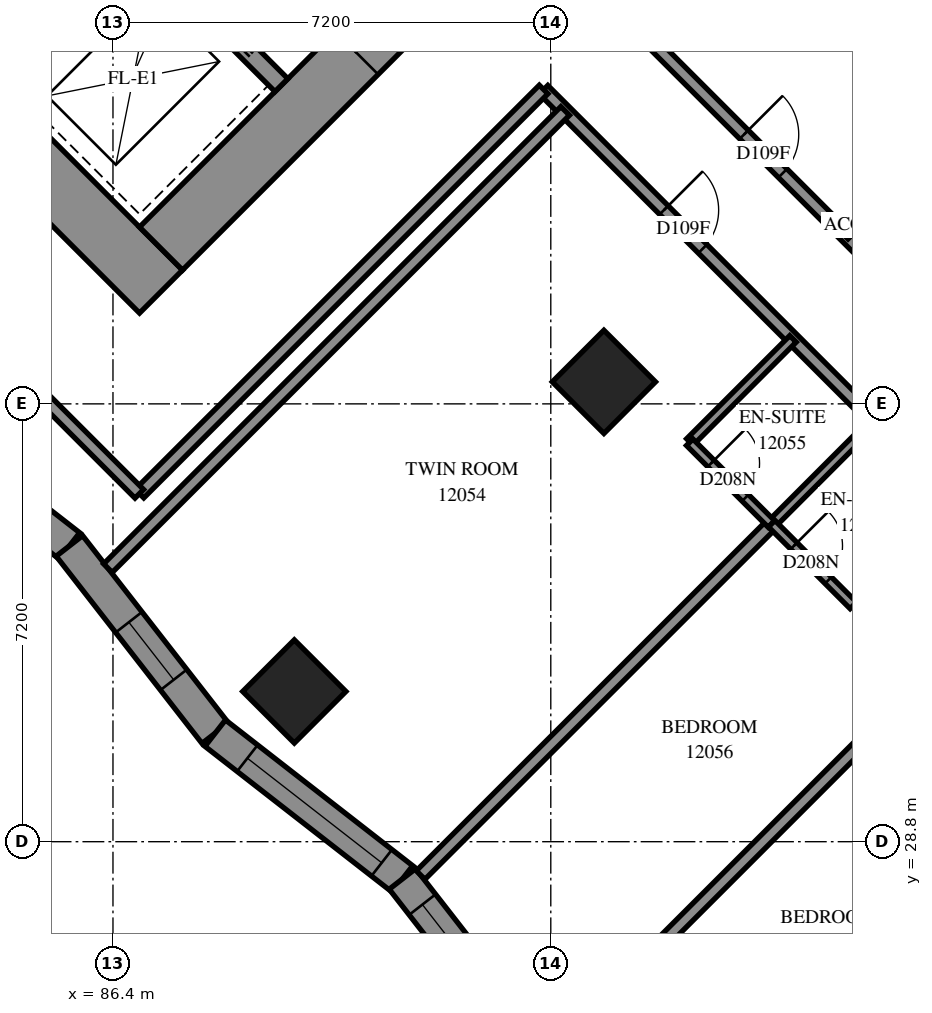
"""IFC4 building model, lengths in metres.
Left out: names, types, materials, properties, quantities, classifications, styles, units other than length and angle.
Written with IfcOpenShell. Run it as: python <this file> out.ifc"""

import sys

from ifc_helpers import new_model, si_unit, direction, frame, frame_2d, origin, origin_2d, place, context, subcontext, project, spatial, polyline, rectangle, outline, extrude, element, fill, save


model = new_model("IFC4")
c1 = context("Model", 3, precision=1e-05, world=origin(), true_north=direction((0.0, 1.0)))
c2 = subcontext(c1, "Body", "Model", "MODEL_VIEW")
j1 = project(units=[si_unit("LENGTHUNIT", "METRE"), si_unit("PLANEANGLEUNIT", "RADIAN")], contexts=[c1])
p1 = place(None, origin())
s1 = spatial("IfcSite", under=j1, at=p1, CompositionType="ELEMENT")
p2 = place(p1, origin())
s2 = spatial("IfcBuilding", under=s1, at=p2, CompositionType="ELEMENT")
p3 = place(p2, frame((0.0, 0.0, 47.4)))
s3 = spatial("IfcBuildingStorey", under=s2, at=p3, CompositionType="ELEMENT", Elevation=47.4)
for number, where, z_axis, x_axis in (
    (1, (94.474, 36.362, 0.0), (0.0, 0.0, 1.0), (0.707, -0.707, 0.0)),
    (2, (89.382, 31.271, 0.0), (0.0, 0.0, 1.0), (0.707, -0.707, 0.0)),
):
    element("IfcColumn", number, at=place(p3, frame(where, z_axis=z_axis, x_axis=x_axis)), inside=s3, PredefinedType="COLUMN", context=c2, shape_type="SweptSolid", body=[
        extrude(rectangle(XDim=1.2, YDim=1.2, at=origin_2d()), origin(), (0.0, 0.0, 1.0), 3.1),
    ])
p4 = place(p3, frame((75.594, 49.443, -0.3), z_axis=(0.0, 0.0, 1.0), x_axis=(0.7071037324, -0.70710983, 0.0)))
e3 = element("IfcWall", 3, at=p4, inside=s3, PredefinedType="SHEAR", context=c2, shape_type="SweptSolid", body=[
    extrude(rectangle(XDim=16.4, YDim=1.0, at=frame_2d((8.2, 0.0))), origin(), (0.0, 0.0, 1.0), 2.7),
])
p5 = place(p3, frame((87.19, 38.554, -0.3), z_axis=(0.0, 0.0, 1.0), x_axis=(0.707103309, 0.7071102534, 0.0)))
e4 = element("IfcWall", 4, at=p5, inside=s3, PredefinedType="SHEAR", context=c2, shape_type="SweptSolid", body=[
    extrude(rectangle(XDim=14.4, YDim=1.0, at=frame_2d((7.2, 0.0))), origin(), (0.0, 0.0, 1.0), 2.7),
])
p6 = place(p5, frame((4.55, 0.0, 0.3)))
e5 = element("IfcOpeningElement", 5, at=p6, cuts=e4, PredefinedType="OPENING", context=c2, shape_type="SweptSolid", body=[
    extrude(rectangle(XDim=1.1, YDim=2.1, at=frame_2d((0.55, 1.05))), frame((0.0, 0.51, 0.0), z_axis=(0.0, -1.0, 0.0), x_axis=(1.0, 0.0, 0.0)), (0.0, 0.0, 1.0), 1.02),
])
p7 = place(p5, frame((11.35, 0.0, 0.3)))
e6 = element("IfcOpeningElement", 6, at=p7, cuts=e4, PredefinedType="OPENING", context=c2, shape_type="SweptSolid", body=[
    extrude(rectangle(XDim=1.1, YDim=2.1, at=frame_2d((0.55, 1.05))), frame((0.0, 0.51, 0.0), z_axis=(0.0, -1.0, 0.0), x_axis=(1.0, 0.0, 0.0)), (0.0, 0.0, 1.0), 1.02),
])
p8 = place(p3, frame((84.291, 41.453, 0.0), z_axis=(0.0, 0.0, 1.0), x_axis=(0.7071067812, 0.7071067812, 0.0)))
e7 = element("IfcWall", 7, at=p8, inside=s3, PredefinedType="SOLIDWALL", context=c2, shape_type="SweptSolid", body=[
    extrude(rectangle(XDim=3.3, YDim=0.3, at=frame_2d((1.65, 0.0))), origin(), (0.0, 0.0, 1.0), 3.1),
])
p9 = place(p3, frame((78.988, 51.423, 0.0), z_axis=(0.0, 0.0, 1.0), x_axis=(0.7071067812, -0.7071067812, 0.0)))
e8 = element("IfcWall", 8, at=p9, inside=s3, PredefinedType="SOLIDWALL", context=c2, shape_type="SweptSolid", body=[
    extrude(rectangle(XDim=14.4, YDim=0.3, at=frame_2d((7.2, 0.0))), origin(), (0.0, 0.0, 1.0), 3.1),
])
p10 = place(p9, frame((1.25, 0.0, 0.0)))
e9 = element("IfcOpeningElement", 9, at=p10, cuts=e8, PredefinedType="OPENING", context=c2, shape_type="SweptSolid", body=[
    extrude(rectangle(XDim=1.1, YDim=2.1, at=frame_2d((0.55, 1.05))), frame((0.0, 0.16, 0.0), z_axis=(0.0, -1.0, 0.0), x_axis=(1.0, 0.0, 0.0)), (0.0, 0.0, 1.0), 0.32),
])
p11 = place(p9, frame((4.85, 0.0, 0.0)))
e10 = element("IfcOpeningElement", 10, at=p11, cuts=e8, PredefinedType="OPENING", context=c2, shape_type="SweptSolid", body=[
    extrude(rectangle(XDim=1.1, YDim=2.1, at=frame_2d((0.55, 1.05))), frame((0.0, 0.16, 0.0), z_axis=(0.0, -1.0, 0.0), x_axis=(1.0, 0.0, 0.0)), (0.0, 0.0, 1.0), 0.32),
])
p12 = place(p9, frame((8.45, 0.0, 0.0)))
e11 = element("IfcOpeningElement", 11, at=p12, cuts=e8, PredefinedType="OPENING", context=c2, shape_type="SweptSolid", body=[
    extrude(rectangle(XDim=1.1, YDim=2.1, at=frame_2d((0.55, 1.05))), frame((0.0, 0.16, 0.0), z_axis=(0.0, -1.0, 0.0), x_axis=(1.0, 0.0, 0.0)), (0.0, 0.0, 1.0), 0.32),
])
p13 = place(p9, frame((12.05, 0.0, 0.0)))
e12 = element("IfcOpeningElement", 12, at=p13, cuts=e8, PredefinedType="OPENING", context=c2, shape_type="SweptSolid", body=[
    extrude(rectangle(XDim=1.1, YDim=2.1, at=frame_2d((0.55, 1.05))), frame((0.0, 0.16, 0.0), z_axis=(0.0, -1.0, 0.0), x_axis=(1.0, 0.0, 0.0)), (0.0, 0.0, 1.0), 0.32),
])
p14 = place(p3, frame((82.605, 36.062, 0.0), z_axis=(0.0, 0.0, 1.0), x_axis=(0.7890333801, -0.6143503276, 0.0)))
e13 = element("IfcWall", 13, at=p14, inside=s3, PredefinedType="SOLIDWALL", context=c2, shape_type="SweptSolid", body=[
    extrude(outline(polyline([(-0.034, -0.275), (3.868, -0.275), (3.937, 0.275), (0.034, 0.275), (-0.034, -0.275)])), origin(), (0.0, 0.0, 1.0), 3.1),
])
p15 = place(p14, frame((1.745, 0.0, 0.5)))
e14 = element("IfcOpeningElement", 14, at=p15, cuts=e13, PredefinedType="OPENING", context=c2, shape_type="SweptSolid", body=[
    extrude(rectangle(XDim=1.2, YDim=2.45, at=frame_2d((0.6, 1.225))), frame((0.0, 0.285, 0.0), z_axis=(0.0, -1.0, 0.0), x_axis=(1.0, 0.0, 0.0)), (0.0, 0.0, 1.0), 0.57),
])
p16 = place(p3, frame((85.684, 33.664, 0.0), z_axis=(0.0, 0.0, 1.0), x_axis=(0.6143467956, -0.7890361302, 0.0)))
e15 = element("IfcWall", 15, at=p16, inside=s3, PredefinedType="SOLIDWALL", context=c2, shape_type="SweptSolid", body=[
    extrude(outline(polyline([(0.034, -0.275), (3.937, -0.275), (3.868, 0.275), (-0.034, 0.275), (0.034, -0.275)])), origin(), (0.0, 0.0, 1.0), 3.1),
])
p17 = place(p16, frame((1.591, 0.0, 0.5)))
e16 = element("IfcOpeningElement", 16, at=p17, cuts=e15, PredefinedType="OPENING", context=c2, shape_type="SweptSolid", body=[
    extrude(rectangle(XDim=1.2, YDim=2.45, at=frame_2d((0.6, 1.225))), frame((0.0, 0.285, 0.0), z_axis=(0.0, -1.0, 0.0), x_axis=(1.0, 0.0, 0.0)), (0.0, 0.0, 1.0), 0.57),
])
p18 = place(p3, frame((88.081, 30.585, 0.0), z_axis=(0.0, 0.0, 1.0), x_axis=(0.7890458015, -0.614334374, 0.0)))
e17 = element("IfcWall", 17, at=p18, inside=s3, PredefinedType="SOLIDWALL", context=c2, shape_type="SweptSolid", body=[
    extrude(outline(polyline([(-0.034, -0.275), (3.868, -0.275), (3.937, 0.275), (0.034, 0.275), (-0.034, -0.275)])), origin(), (0.0, 0.0, 1.0), 3.1),
])
p19 = place(p18, frame((0.67, 0.0, 0.5)))
e18 = element("IfcOpeningElement", 18, at=p19, cuts=e17, PredefinedType="OPENING", context=c2, shape_type="SweptSolid", body=[
    extrude(rectangle(XDim=2.8, YDim=2.45, at=frame_2d((1.4, 1.225))), frame((0.0, 0.285, 0.0), z_axis=(0.0, -1.0, 0.0), x_axis=(1.0, 0.0, 0.0)), (0.0, 0.0, 1.0), 0.57),
])
p20 = place(p3, frame((91.16, 28.188, 0.0), z_axis=(0.0, 0.0, 1.0), x_axis=(0.614334374, -0.7890458015, 0.0)))
e19 = element("IfcWall", 19, at=p20, inside=s3, PredefinedType="SOLIDWALL", context=c2, shape_type="SweptSolid", body=[
    extrude(outline(polyline([(0.034, -0.275), (3.937, -0.275), (3.868, 0.275), (-0.034, 0.275), (0.034, -0.275)])), origin(), (0.0, 0.0, 1.0), 3.1),
])
p21 = place(p20, frame((0.534, 0.0, 0.5)))
e20 = element("IfcOpeningElement", 20, at=p21, cuts=e19, PredefinedType="OPENING", context=c2, shape_type="SweptSolid", body=[
    extrude(rectangle(XDim=2.8, YDim=2.45, at=frame_2d((1.4, 1.225))), frame((0.0, 0.285, 0.0), z_axis=(0.0, -1.0, 0.0), x_axis=(1.0, 0.0, 0.0)), (0.0, 0.0, 1.0), 0.57),
])
p22 = place(p3, frame((93.481, 41.167, 0.0), z_axis=(0.0, 0.0, 1.0), x_axis=(0.7071067812, -0.7071067812, 0.0)))
e21 = element("IfcWall", 21, at=p22, inside=s3, PredefinedType="PARTITIONING", context=c2, shape_type="SweptSolid", body=[
    extrude(rectangle(XDim=25.699, YDim=0.2, at=frame_2d((12.85, 0.0))), origin(), (0.0, 0.0, 1.0), 3.1),
])
p23 = place(p22, frame((2.8, 0.0, 0.0)))
e22 = element("IfcOpeningElement", 22, at=p23, cuts=e21, PredefinedType="OPENING", context=c2, shape_type="SweptSolid", body=[
    extrude(rectangle(XDim=0.9, YDim=2.1, at=frame_2d((0.45, 1.05))), frame((0.0, 0.11, 0.0), z_axis=(0.0, -1.0, 0.0), x_axis=(1.0, 0.0, 0.0)), (0.0, 0.0, 1.0), 0.22),
])
p24 = place(p22, frame((9.948, 0.0, 0.0)))
e23 = element("IfcOpeningElement", 23, at=p24, cuts=e21, PredefinedType="OPENING", context=c2, shape_type="SweptSolid", body=[
    extrude(rectangle(XDim=0.9, YDim=2.1, at=frame_2d((0.45, 1.05))), frame((0.0, 0.11, 0.0), z_axis=(0.0, -1.0, 0.0), x_axis=(1.0, 0.0, 0.0)), (0.0, 0.0, 1.0), 0.22),
])
p25 = place(p22, frame((11.7, 0.0, 0.0)))
e24 = element("IfcOpeningElement", 24, at=p25, cuts=e21, PredefinedType="OPENING", context=c2, shape_type="SweptSolid", body=[
    extrude(rectangle(XDim=0.9, YDim=2.1, at=frame_2d((0.45, 1.05))), frame((0.0, 0.11, 0.0), z_axis=(0.0, -1.0, 0.0), x_axis=(1.0, 0.0, 0.0)), (0.0, 0.0, 1.0), 0.22),
])
p26 = place(p22, frame((17.25, 0.0, 0.0)))
e25 = element("IfcOpeningElement", 25, at=p26, cuts=e21, PredefinedType="OPENING", context=c2, shape_type="SweptSolid", body=[
    extrude(rectangle(XDim=0.9, YDim=2.1, at=frame_2d((0.45, 1.05))), frame((0.0, 0.11, 0.0), z_axis=(0.0, -1.0, 0.0), x_axis=(1.0, 0.0, 0.0)), (0.0, 0.0, 1.0), 0.22),
])
p27 = place(p22, frame((22.82, 0.0, 0.0)))
e26 = element("IfcOpeningElement", 26, at=p27, cuts=e21, PredefinedType="OPENING", context=c2, shape_type="SweptSolid", body=[
    extrude(rectangle(XDim=0.9, YDim=2.1, at=frame_2d((0.45, 1.05))), frame((0.0, 0.11, 0.0), z_axis=(0.0, -1.0, 0.0), x_axis=(1.0, 0.0, 0.0)), (0.0, 0.0, 1.0), 0.22),
])
p28 = place(p3, frame((86.317, 33.298, 0.0), z_axis=(0.0, 0.0, 1.0), x_axis=(0.7071020793, 0.7071114831, 0.0)))
e27 = element("IfcWall", 27, at=p28, inside=s3, PredefinedType="PARTITIONING", context=c2, shape_type="SweptSolid", body=[
    extrude(rectangle(XDim=10.634, YDim=0.2, at=frame_2d((5.317, 0.0))), origin(), (0.0, 0.0, 1.0), 3.1),
])
p29 = place(p3, frame((94.761, 42.446, 0.0), z_axis=(0.0, 0.0, 1.0), x_axis=(0.7071067812, -0.7071067812, 0.0)))
e28 = element("IfcWall", 28, at=p29, inside=s3, PredefinedType="PARTITIONING", context=c2, shape_type="SweptSolid", body=[
    extrude(rectangle(XDim=9.597, YDim=0.2, at=frame_2d((4.798, 0.0))), origin(), (0.0, 0.0, 1.0), 3.1),
])
p30 = place(p29, frame((2.851, 0.0, 0.0)))
e29 = element("IfcOpeningElement", 29, at=p30, cuts=e28, PredefinedType="OPENING", context=c2, shape_type="SweptSolid", body=[
    extrude(rectangle(XDim=0.9, YDim=2.1, at=frame_2d((0.45, 1.05))), frame((0.0, 0.11, 0.0), z_axis=(0.0, -1.0, 0.0), x_axis=(1.0, 0.0, 0.0)), (0.0, 0.0, 1.0), 0.22),
])
p31 = place(p3, frame((86.836, 34.524, 0.0), z_axis=(0.0, 0.0, 1.0), x_axis=(0.7071067812, 0.7071067812, 0.0)))
e30 = element("IfcWall", 30, at=p31, inside=s3, PredefinedType="PARTITIONING", context=c2, shape_type="SweptSolid", body=[
    extrude(rectangle(XDim=9.399, YDim=0.2, at=frame_2d((4.699, 0.0))), origin(), (0.0, 0.0, 1.0), 3.1),
])
p32 = place(p3, frame((96.528, 23.144, 0.0), z_axis=(0.0, 0.0, 1.0), x_axis=(0.7071067812, 0.7071067812, 0.0)))
e31 = element("IfcWall", 31, at=p32, inside=s3, PredefinedType="PARTITIONING", context=c2, shape_type="SweptSolid", body=[
    extrude(rectangle(XDim=8.195, YDim=0.2, at=frame_2d((4.098, 0.0))), origin(), (0.0, 0.0, 1.0), 3.1),
])
p33 = place(p3, frame((91.459, 28.251, 0.0), z_axis=(0.0, 0.0, 1.0), x_axis=(0.7072292176, 0.7069843236, 0.0)))
e32 = element("IfcWall", 32, at=p33, inside=s3, PredefinedType="PARTITIONING", context=c2, shape_type="SweptSolid", body=[
    extrude(rectangle(XDim=8.167, YDim=0.2, at=frame_2d((4.083, 0.0))), origin(), (0.0, 0.0, 1.0), 3.1),
])
p34 = place(p3, frame((95.073, 26.781, 0.0), z_axis=(0.0, 0.0, 1.0), x_axis=(0.7071067812, 0.7071067812, 0.0)))
e33 = element("IfcWall", 33, at=p34, inside=s3, PredefinedType="PARTITIONING", context=c2, shape_type="SweptSolid", body=[
    extrude(rectangle(XDim=5.501, YDim=0.2, at=frame_2d((2.751, 0.0))), origin(), (0.0, 0.0, 1.0), 3.1),
])
p35 = place(p3, frame((84.889, 36.465, 0.0), z_axis=(0.0, 0.0, 1.0), x_axis=(0.7071067812, -0.7071067812, 0.0)))
e34 = element("IfcWall", 34, at=p35, inside=s3, PredefinedType="PARTITIONING", context=c2, shape_type="SweptSolid", body=[
    extrude(rectangle(XDim=2.749, YDim=0.2, at=frame_2d((1.375, 0.0))), origin(), (0.0, 0.0, 1.0), 3.1),
])
p36 = place(p3, frame((98.573, 32.685, 0.0), z_axis=(0.0, 0.0, 1.0), x_axis=(0.7071067812, 0.7071067812, 0.0)))
e35 = element("IfcWall", 35, at=p36, inside=s3, PredefinedType="PARTITIONING", context=c2, shape_type="SweptSolid", body=[
    extrude(rectangle(XDim=2.401, YDim=0.15, at=frame_2d((1.201, 0.0))), origin(), (0.0, 0.0, 1.0), 3.1),
])
for number, where, z_axis, x_axis in (
    (36, (97.234, 34.026, 0.0), (0.0, 0.0, 1.0), (0.707, 0.708, 0.0)),
    (37, (98.435, 38.765, 0.0), (0.0, 0.0, 1.0), (0.707, 0.708, 0.0)),
):
    element("IfcWall", number, at=place(p3, frame(where, z_axis=z_axis, x_axis=x_axis)), inside=s3, PredefinedType="PARTITIONING", context=c2, shape_type="SweptSolid", body=[
        extrude(rectangle(XDim=2.4, YDim=0.15, at=frame_2d((1.2, 0.0))), origin(), (0.0, 0.0, 1.0), 3.1),
    ])
p37 = place(p3, frame((95.887, 35.373, 0.0), z_axis=(0.0, 0.0, 1.0), x_axis=(0.7071067812, 0.7071067812, 0.0)))
e38 = element("IfcWall", 38, at=p37, inside=s3, PredefinedType="PARTITIONING", context=c2, shape_type="SweptSolid", body=[
    extrude(rectangle(XDim=2.398, YDim=0.15, at=frame_2d((1.199, 0.0))), origin(), (0.0, 0.0, 1.0), 3.1),
])
p38 = place(p3, frame((95.885, 35.369, 0.0), z_axis=(0.0, 0.0, 1.0), x_axis=(0.7071067812, -0.7071067812, 0.0)))
e39 = element("IfcWall", 39, at=p38, inside=s3, PredefinedType="PARTITIONING", context=c2, shape_type="SweptSolid", body=[
    extrude(rectangle(XDim=1.901, YDim=0.15, at=frame_2d((0.95, 0.0))), origin(), (0.0, 0.0, 1.0), 3.1),
])
p39 = place(p38, frame((0.493, 0.0, 0.0)))
e40 = element("IfcOpeningElement", 40, at=p39, cuts=e39, PredefinedType="OPENING", context=c2, shape_type="SweptSolid", body=[
    extrude(rectangle(XDim=0.8, YDim=2.1, at=frame_2d((0.4, 1.05))), frame((0.0, 0.085, 0.0), z_axis=(0.0, -1.0, 0.0), x_axis=(1.0, 0.0, 0.0)), (0.0, 0.0, 1.0), 0.17),
])
p40 = place(p3, frame((97.233, 34.029, 0.0), z_axis=(0.0, 0.0, 1.0), x_axis=(0.7065800724, -0.7076330979, 0.0)))
e41 = element("IfcWall", 41, at=p40, inside=s3, PredefinedType="PARTITIONING", context=c2, shape_type="SweptSolid", body=[
    extrude(rectangle(XDim=1.899, YDim=0.15, at=frame_2d((0.95, 0.0))), origin(), (0.0, 0.0, 1.0), 3.1),
])
p41 = place(p40, frame((0.515, 0.0, 0.0)))
e42 = element("IfcOpeningElement", 42, at=p41, cuts=e41, PredefinedType="OPENING", context=c2, shape_type="SweptSolid", body=[
    extrude(rectangle(XDim=0.8, YDim=2.1, at=frame_2d((0.4, 1.05))), frame((0.0, 0.085, 0.0), z_axis=(0.0, -1.0, 0.0), x_axis=(1.0, 0.0, 0.0)), (0.0, 0.0, 1.0), 0.17),
])
p42 = place(p17, origin())
e43 = element("IfcWindow", 43, at=p42, inside=s3, PartitioningType="SINGLE_PANEL", PredefinedType="WINDOW", context=c2, shape_type="SweptSolid", body=[
    extrude(rectangle(XDim=1.2, YDim=2.45, at=frame_2d((0.6, 1.225))), frame((0.0, 0.155, 0.0), z_axis=(0.0, -1.0, 0.0), x_axis=(1.0, 0.0, 0.0)), (0.0, 0.0, 1.0), 0.06),
])
fill(e16, e43)
p43 = place(p19, origin())
e44 = element("IfcWindow", 44, at=p43, inside=s3, PartitioningType="SINGLE_PANEL", PredefinedType="WINDOW", context=c2, shape_type="SweptSolid", body=[
    extrude(rectangle(XDim=2.8, YDim=2.45, at=frame_2d((1.4, 1.225))), frame((0.0, 0.155, 0.0), z_axis=(0.0, -1.0, 0.0), x_axis=(1.0, 0.0, 0.0)), (0.0, 0.0, 1.0), 0.06),
])
fill(e18, e44)
p44 = place(p21, origin())
e45 = element("IfcWindow", 45, at=p44, inside=s3, PartitioningType="SINGLE_PANEL", PredefinedType="WINDOW", context=c2, shape_type="SweptSolid", body=[
    extrude(rectangle(XDim=2.8, YDim=2.45, at=frame_2d((1.4, 1.225))), frame((0.0, 0.155, 0.0), z_axis=(0.0, -1.0, 0.0), x_axis=(1.0, 0.0, 0.0)), (0.0, 0.0, 1.0), 0.06),
])
fill(e20, e45)
p45 = place(p6, origin())
e46 = element("IfcDoor", 46, at=p45, inside=s3, OperationType="DOUBLE_DOOR_SINGLE_SWING", PredefinedType="DOOR", context=c2, shape_type="SweptSolid", body=[
    extrude(rectangle(XDim=1.1, YDim=2.1, at=frame_2d((0.55, 1.05))), frame((0.0, 0.025, 0.0), z_axis=(0.0, -1.0, 0.0), x_axis=(1.0, 0.0, 0.0)), (0.0, 0.0, 1.0), 0.05),
])
fill(e5, e46)
p46 = place(p30, origin())
e47 = element("IfcDoor", 47, at=p46, inside=s3, OperationType="SINGLE_SWING_RIGHT", PredefinedType="DOOR", context=c2, shape_type="SweptSolid", body=[
    extrude(rectangle(XDim=0.9, YDim=2.1, at=frame_2d((0.45, 1.05))), frame((0.0, 0.025, 0.0), z_axis=(0.0, -1.0, 0.0), x_axis=(1.0, 0.0, 0.0)), (0.0, 0.0, 1.0), 0.05),
])
fill(e29, e47)
p47 = place(p23, origin())
e48 = element("IfcDoor", 48, at=p47, inside=s3, OperationType="SINGLE_SWING_LEFT", PredefinedType="DOOR", context=c2, shape_type="SweptSolid", body=[
    extrude(rectangle(XDim=0.9, YDim=2.1, at=frame_2d((0.45, 1.05))), frame((0.0, 0.025, 0.0), z_axis=(0.0, -1.0, 0.0), x_axis=(1.0, 0.0, 0.0)), (0.0, 0.0, 1.0), 0.05),
])
fill(e22, e48)
p48 = place(p39, origin())
e49 = element("IfcDoor", 49, at=p48, inside=s3, OperationType="SINGLE_SWING_RIGHT", PredefinedType="DOOR", context=c2, shape_type="SweptSolid", body=[
    extrude(rectangle(XDim=0.8, YDim=2.1, at=frame_2d((0.4, 1.05))), frame((0.0, 0.025, 0.0), z_axis=(0.0, -1.0, 0.0), x_axis=(1.0, 0.0, 0.0)), (0.0, 0.0, 1.0), 0.05),
])
fill(e40, e49)
p49 = place(p41, origin())
e50 = element("IfcDoor", 50, at=p49, inside=s3, OperationType="SINGLE_SWING_RIGHT", PredefinedType="DOOR", context=c2, shape_type="SweptSolid", body=[
    extrude(rectangle(XDim=0.8, YDim=2.1, at=frame_2d((0.4, 1.05))), frame((0.0, 0.025, 0.0), z_axis=(0.0, -1.0, 0.0), x_axis=(1.0, 0.0, 0.0)), (0.0, 0.0, 1.0), 0.05),
])
fill(e42, e50)
save(model, sys.argv[1])
